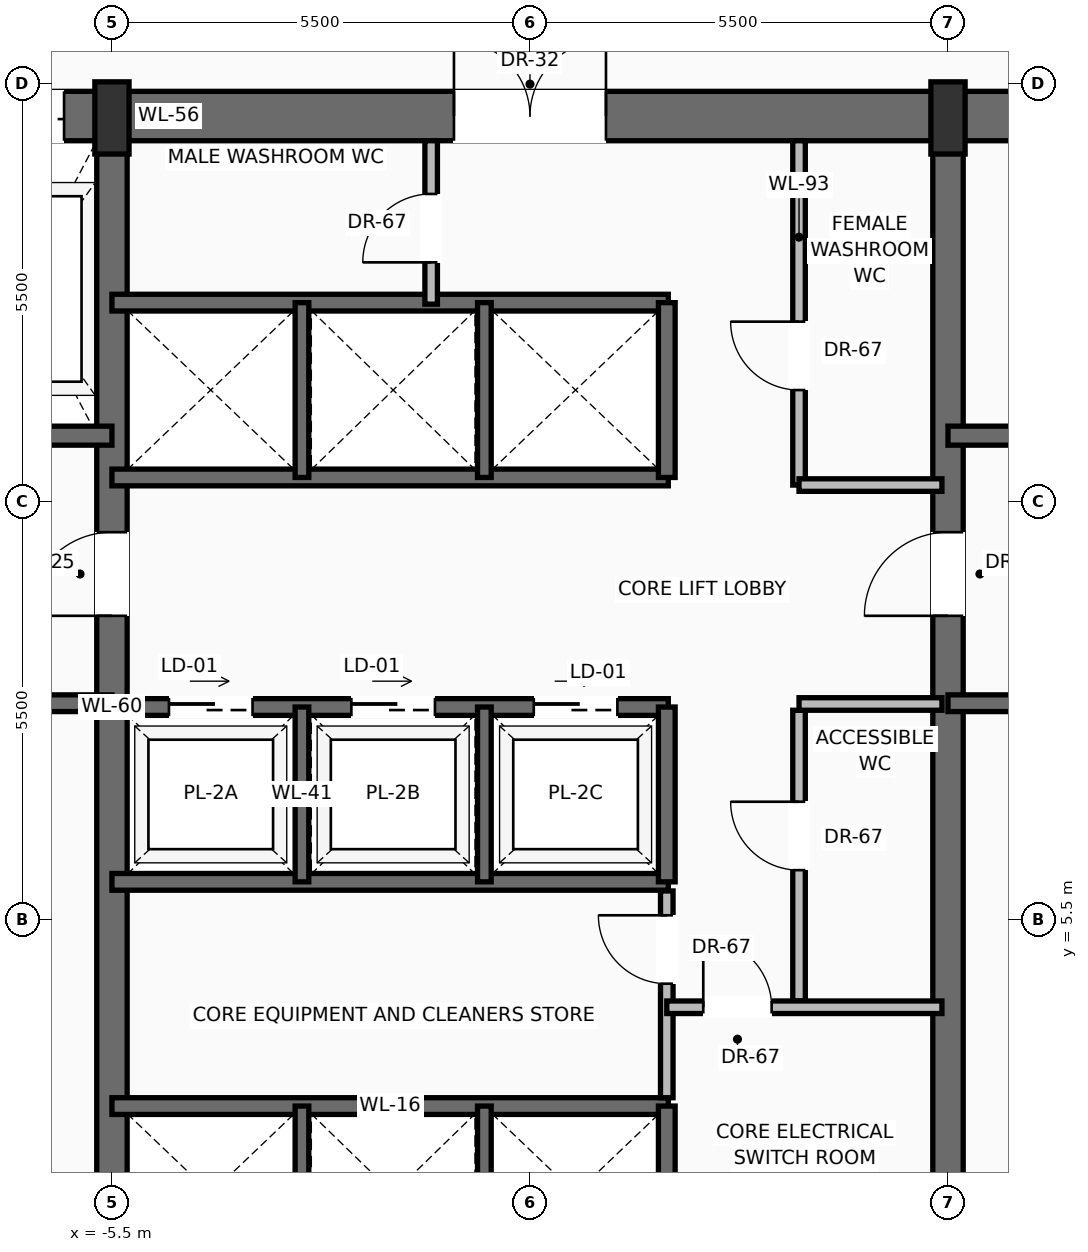
"""IFC4 building model, lengths in metres.
Left out: names, types, materials, properties, quantities, classifications, styles, units other than length and angle.
Written with IfcOpenShell. Run it as: python <this file> out.ifc"""

import sys

from ifc_helpers import new_model, si_unit, direction, frame, frame_2d, origin, origin_2d, place, context, subcontext, project, spatial, rectangle, extrude, source, transform, mapped, element, fill, save


model = new_model("IFC4")
c1 = context("Model", 3, precision=1e-05, world=origin(), true_north=direction((0.0, 1.0)))
c2 = subcontext(c1, "Body", "Model", "MODEL_VIEW")
j1 = project(units=[si_unit("LENGTHUNIT", "METRE"), si_unit("PLANEANGLEUNIT", "RADIAN")], contexts=[c1])
p1 = place(None, origin())
s1 = spatial("IfcSite", under=j1, at=p1, CompositionType="ELEMENT")
p2 = place(p1, origin())
s2 = spatial("IfcBuilding", under=s1, at=p2, CompositionType="ELEMENT")
p3 = place(p2, frame((0.0, 0.0, 125.6)))
s3 = spatial("IfcBuildingStorey", under=s2, at=p3, CompositionType="ELEMENT", Elevation=125.6)
p4 = place(p3, frame((-10.8, 16.075, 0.0), z_axis=(0.0, 0.0, 1.0), x_axis=(1.0, 0.0, 0.0)))
e1 = element("IfcWall", 1, at=p4, inside=s3, PredefinedType="SHEAR", context=c2, shape_type="SweptSolid", body=[
    extrude(rectangle(XDim=21.6, YDim=0.65, at=frame_2d((10.8, 0.0))), origin(), (0.0, 0.0, 1.0), 3.47),
])
p5 = place(p4, frame((3.37, 0.0, 0.0)))
e2 = element("IfcOpeningElement", 2, at=p5, cuts=e1, PredefinedType="OPENING", context=c2, shape_type="SweptSolid", body=[
    extrude(rectangle(XDim=1.3, YDim=2.3, at=frame_2d((0.65, 1.15))), frame((0.0, 0.335, 0.0), z_axis=(0.0, -1.0, 0.0), x_axis=(1.0, 0.0, 0.0)), (0.0, 0.0, 1.0), 0.67),
])
p6 = place(p4, frame((9.8, 0.0, 0.0)))
e3 = element("IfcOpeningElement", 3, at=p6, cuts=e1, PredefinedType="OPENING", context=c2, shape_type="SweptSolid", body=[
    extrude(rectangle(XDim=2.0, YDim=2.4, at=frame_2d((1.0, 1.2))), frame((0.0, 0.335, 0.0), z_axis=(0.0, -1.0, 0.0), x_axis=(1.0, 0.0, 0.0)), (0.0, 0.0, 1.0), 0.67),
])
p7 = place(p3, frame((-5.5, 0.525, 0.0), z_axis=(0.0, 0.0, 1.0), x_axis=(0.0, 1.0, 0.0)))
e4 = element("IfcWall", 4, at=p7, inside=s3, PredefinedType="SHEAR", context=c2, shape_type="SweptSolid", body=[
    extrude(rectangle(XDim=15.55, YDim=0.4, at=frame_2d((7.775, 0.0))), origin(), (0.0, 0.0, 1.0), 3.47),
])
p8 = place(p7, frame((8.975, 0.0, 0.0)))
e5 = element("IfcOpeningElement", 5, at=p8, cuts=e4, PredefinedType="OPENING", context=c2, shape_type="SweptSolid", body=[
    extrude(rectangle(XDim=1.1, YDim=2.2, at=frame_2d((0.55, 1.1))), frame((0.0, 0.21, 0.0), z_axis=(0.0, -1.0, 0.0), x_axis=(1.0, 0.0, 0.0)), (0.0, 0.0, 1.0), 0.42),
])
p9 = place(p3, frame((5.5, 0.525, 0.0), z_axis=(0.0, 0.0, 1.0), x_axis=(0.0, 1.0, 0.0)))
e6 = element("IfcWall", 6, at=p9, inside=s3, PredefinedType="SHEAR", context=c2, shape_type="SweptSolid", body=[
    extrude(rectangle(XDim=15.55, YDim=0.4, at=frame_2d((7.775, 0.0))), origin(), (0.0, 0.0, 1.0), 3.47),
])
p10 = place(p9, frame((8.975, 0.0, 0.0)))
e7 = element("IfcOpeningElement", 7, at=p10, cuts=e6, PredefinedType="OPENING", context=c2, shape_type="SweptSolid", body=[
    extrude(rectangle(XDim=1.1, YDim=2.2, at=frame_2d((0.55, 1.1))), frame((0.0, 0.21, 0.0), z_axis=(0.0, -1.0, 0.0), x_axis=(1.0, 0.0, 0.0)), (0.0, 0.0, 1.0), 0.42),
])
m1 = source(origin(), c2, "Body", "SweptSolid", [
    extrude(rectangle(XDim=0.45, YDim=0.95, at=origin_2d()), origin(), (0.0, 0.0, 1.0), 3.7),
])
for number, where, z_axis, x_axis in (
    (8, (-5.5, 16.05, 0.0), (0.0, 0.0, 1.0), (1.0, 0.0, 0.0)),
    (9, (5.5, 16.05, 0.0), (0.0, 0.0, 1.0), (1.0, 0.0, 0.0)),
):
    element("IfcColumn", number, at=place(p3, frame(where, z_axis=z_axis, x_axis=x_axis)), inside=s3, PredefinedType="PILASTER", context=c2, shape_type="MappedRepresentation", body=[
        mapped(m1, transform((0.0, 0.0, 0.0), scale=1.0)),
    ])
p11 = place(p3, frame((-5.5, 8.35, 0.0), z_axis=(0.0, 0.0, 1.0), x_axis=(-1.0, 0.0, 0.0)))
e10 = element("IfcWall", 10, at=p11, inside=s3, PredefinedType="SOLIDWALL", context=c2, shape_type="SweptSolid", body=[
    extrude(rectangle(XDim=4.65, YDim=0.22, at=frame_2d((2.325, 0.0))), origin(), (0.0, 0.0, 1.0), 3.47),
])
p12 = place(p11, frame((2.5, 0.0, 0.0)))
e11 = element("IfcOpeningElement", 11, at=p12, cuts=e10, PredefinedType="OPENING", context=c2, shape_type="SweptSolid", body=[
    extrude(rectangle(XDim=1.15, YDim=2.2, at=frame_2d((0.575, 1.1))), frame((0.0, 0.12, 0.0), z_axis=(0.0, -1.0, 0.0), x_axis=(1.0, 0.0, 0.0)), (0.0, 0.0, 1.0), 0.24),
])
p13 = place(p3, frame((-5.5, 11.87, 0.0), z_axis=(0.0, 0.0, 1.0), x_axis=(-1.0, 0.0, 0.0)))
e12 = element("IfcWall", 12, at=p13, inside=s3, PredefinedType="SOLIDWALL", context=c2, shape_type="SweptSolid", body=[
    extrude(rectangle(XDim=4.65, YDim=0.25, at=frame_2d((2.325, 0.0))), origin(), (0.0, 0.0, 1.0), 3.47),
])
p14 = place(p13, frame((2.95, 0.0, 0.0)))
e13 = element("IfcOpeningElement", 13, at=p14, cuts=e12, PredefinedType="OPENING", context=c2, shape_type="SweptSolid", body=[
    extrude(rectangle(XDim=1.2, YDim=2.25, at=frame_2d((0.6, 1.125))), frame((0.0, 0.135, 0.0), z_axis=(0.0, -1.0, 0.0), x_axis=(1.0, 0.0, 0.0)), (0.0, 0.0, 1.0), 0.27),
])
p15 = place(p3, frame((10.15, 8.35, 0.0), z_axis=(0.0, 0.0, 1.0), x_axis=(-1.0, 0.0, 0.0)))
e14 = element("IfcWall", 14, at=p15, inside=s3, PredefinedType="SOLIDWALL", context=c2, shape_type="SweptSolid", body=[
    extrude(rectangle(XDim=4.65, YDim=0.22, at=frame_2d((2.325, 0.0))), origin(), (0.0, 0.0, 1.0), 3.47),
])
p16 = place(p15, frame((1.0, 0.0, 0.0)))
e15 = element("IfcOpeningElement", 15, at=p16, cuts=e14, PredefinedType="OPENING", context=c2, shape_type="SweptSolid", body=[
    extrude(rectangle(XDim=1.15, YDim=2.2, at=frame_2d((0.575, 1.1))), frame((0.0, 0.12, 0.0), z_axis=(0.0, -1.0, 0.0), x_axis=(1.0, 0.0, 0.0)), (0.0, 0.0, 1.0), 0.24),
])
p17 = place(p3, frame((10.15, 11.87, 0.0), z_axis=(0.0, 0.0, 1.0), x_axis=(-1.0, 0.0, 0.0)))
e16 = element("IfcWall", 16, at=p17, inside=s3, PredefinedType="SOLIDWALL", context=c2, shape_type="SweptSolid", body=[
    extrude(rectangle(XDim=4.65, YDim=0.25, at=frame_2d((2.325, 0.0))), origin(), (0.0, 0.0, 1.0), 3.47),
])
p18 = place(p17, frame((0.5, 0.0, 0.0)))
e17 = element("IfcOpeningElement", 17, at=p18, cuts=e16, PredefinedType="OPENING", context=c2, shape_type="SweptSolid", body=[
    extrude(rectangle(XDim=1.2, YDim=2.25, at=frame_2d((0.6, 1.125))), frame((0.0, 0.135, 0.0), z_axis=(0.0, -1.0, 0.0), x_axis=(1.0, 0.0, 0.0)), (0.0, 0.0, 1.0), 0.27),
])
p19 = place(p3, frame((-5.5, 3.05, 0.0), z_axis=(0.0, 0.0, 1.0), x_axis=(1.0, 0.0, 0.0)))
e18 = element("IfcWall", 18, at=p19, inside=s3, PredefinedType="SOLIDWALL", context=c2, shape_type="SweptSolid", body=[
    extrude(rectangle(XDim=7.32, YDim=0.22, at=frame_2d((3.66, 0.0))), origin(), (0.0, 0.0, 1.0), 3.47),
])
p20 = place(p3, frame((1.8, 0.85, 0.0), z_axis=(0.0, 0.0, 1.0), x_axis=(0.0, 1.0, 0.0)))
e19 = element("IfcWall", 19, at=p20, inside=s3, PredefinedType="SOLIDWALL", context=c2, shape_type="SweptSolid", body=[
    extrude(rectangle(XDim=2.2, YDim=0.22, at=frame_2d((1.1, 0.0))), origin(), (0.0, 0.0, 1.0), 3.47),
])
for number, where, z_axis, x_axis in (
    (20, (-3.0, 0.85, 0.0), (0.0, 0.0, 1.0), (0.0, 1.0, 0.0)),
    (21, (-0.6, 0.85, 0.0), (0.0, 0.0, 1.0), (0.0, 1.0, 0.0)),
):
    element("IfcWall", number, at=place(p3, frame(where, z_axis=z_axis, x_axis=x_axis)), inside=s3, PredefinedType="SOLIDWALL", context=c2, shape_type="SweptSolid", body=[
        extrude(rectangle(XDim=2.2, YDim=0.18, at=frame_2d((1.1, 0.0))), origin(), (0.0, 0.0, 1.0), 3.47),
    ])
p21 = place(p3, frame((1.8, 3.16, 0.0), z_axis=(0.0, 0.0, 1.0), x_axis=(0.0, 1.0, 0.0)))
e22 = element("IfcWall", 22, at=p21, inside=s3, PredefinedType="PARTITIONING", context=c2, shape_type="SweptSolid", body=[
    extrude(rectangle(XDim=2.72, YDim=0.165, at=frame_2d((1.36, 0.0))), origin(), (0.0, 0.0, 1.0), 3.462),
])
p22 = place(p21, frame((1.5, 0.0, 0.0)))
e23 = element("IfcOpeningElement", 23, at=p22, cuts=e22, PredefinedType="OPENING", context=c2, shape_type="SweptSolid", body=[
    extrude(rectangle(XDim=0.9, YDim=2.1, at=frame_2d((0.45, 1.05))), frame((0.0, 0.093, 0.0), z_axis=(0.0, -1.0, 0.0), x_axis=(1.0, 0.0, 0.0)), (0.0, 0.0, 1.0), 0.185),
])
p23 = place(p3, frame((3.54, 4.433, 0.0), z_axis=(0.0, 0.0, 1.0), x_axis=(0.0, 1.0, 0.0)))
e24 = element("IfcWall", 24, at=p23, inside=s3, PredefinedType="PARTITIONING", context=c2, shape_type="SweptSolid", body=[
    extrude(rectangle(XDim=3.825, YDim=0.165, at=frame_2d((1.913, 0.0))), origin(), (0.0, 0.0, 1.0), 3.462),
])
p24 = place(p23, frame((1.721, 0.0, 0.0)))
e25 = element("IfcOpeningElement", 25, at=p24, cuts=e24, PredefinedType="OPENING", context=c2, shape_type="SweptSolid", body=[
    extrude(rectangle(XDim=0.9, YDim=2.1, at=frame_2d((0.45, 1.05))), frame((0.0, 0.093, 0.0), z_axis=(0.0, -1.0, 0.0), x_axis=(1.0, 0.0, 0.0)), (0.0, 0.0, 1.0), 0.185),
])
p25 = place(p3, frame((3.54, 8.34, 0.0), z_axis=(0.0, 0.0, 1.0), x_axis=(1.0, 0.0, 0.0)))
e26 = element("IfcWall", 26, at=p25, inside=s3, PredefinedType="PARTITIONING", context=c2, shape_type="SweptSolid", body=[
    extrude(rectangle(XDim=1.88, YDim=0.165, at=frame_2d((0.94, 0.0))), origin(), (0.0, 0.0, 1.0), 3.462),
])
p26 = place(p3, frame((1.8, 4.35, 0.0), z_axis=(0.0, 0.0, 1.0), x_axis=(1.0, 0.0, 0.0)))
e27 = element("IfcWall", 27, at=p26, inside=s3, PredefinedType="PARTITIONING", context=c2, shape_type="SweptSolid", body=[
    extrude(rectangle(XDim=3.62, YDim=0.165, at=frame_2d((1.81, 0.0))), origin(), (0.0, 0.0, 1.0), 3.462),
])
p27 = place(p26, frame((0.48, 0.0, 0.0)))
e28 = element("IfcOpeningElement", 28, at=p27, cuts=e27, PredefinedType="OPENING", context=c2, shape_type="SweptSolid", body=[
    extrude(rectangle(XDim=0.9, YDim=2.1, at=frame_2d((0.45, 1.05))), frame((0.0, 0.093, 0.0), z_axis=(0.0, -1.0, 0.0), x_axis=(1.0, 0.0, 0.0)), (0.0, 0.0, 1.0), 0.185),
])
p28 = place(p3, frame((-5.5, 6.0, 0.0), z_axis=(0.0, 0.0, 1.0), x_axis=(1.0, 0.0, 0.0)))
e29 = element("IfcWall", 29, at=p28, inside=s3, PredefinedType="SOLIDWALL", context=c2, shape_type="SweptSolid", body=[
    extrude(rectangle(XDim=7.32, YDim=0.22, at=frame_2d((3.66, 0.0))), origin(), (0.0, 0.0, 1.0), 3.47),
])
p29 = place(p3, frame((-5.5, 8.3, 0.0), z_axis=(0.0, 0.0, 1.0), x_axis=(1.0, 0.0, 0.0)))
e30 = element("IfcWall", 30, at=p29, inside=s3, PredefinedType="SOLIDWALL", context=c2, shape_type="SweptSolid", body=[
    extrude(rectangle(XDim=7.32, YDim=0.22, at=frame_2d((3.66, 0.0))), origin(), (0.0, 0.0, 1.0), 3.47),
])
p30 = place(p29, frame((0.75, 0.0, 0.0)))
e31 = element("IfcOpeningElement", 31, at=p30, cuts=e30, PredefinedType="OPENING", context=c2, shape_type="SweptSolid", body=[
    extrude(rectangle(XDim=1.1, YDim=2.2, at=frame_2d((0.55, 1.1))), frame((0.0, 0.12, 0.0), z_axis=(0.0, -1.0, 0.0), x_axis=(1.0, 0.0, 0.0)), (0.0, 0.0, 1.0), 0.24),
])
p31 = place(p29, frame((3.15, 0.0, 0.0)))
e32 = element("IfcOpeningElement", 32, at=p31, cuts=e30, PredefinedType="OPENING", context=c2, shape_type="SweptSolid", body=[
    extrude(rectangle(XDim=1.1, YDim=2.2, at=frame_2d((0.55, 1.1))), frame((0.0, 0.12, 0.0), z_axis=(0.0, -1.0, 0.0), x_axis=(1.0, 0.0, 0.0)), (0.0, 0.0, 1.0), 0.24),
])
p32 = place(p29, frame((5.55, 0.0, 0.0)))
e33 = element("IfcOpeningElement", 33, at=p32, cuts=e30, PredefinedType="OPENING", context=c2, shape_type="SweptSolid", body=[
    extrude(rectangle(XDim=1.1, YDim=2.2, at=frame_2d((0.55, 1.1))), frame((0.0, 0.12, 0.0), z_axis=(0.0, -1.0, 0.0), x_axis=(1.0, 0.0, 0.0)), (0.0, 0.0, 1.0), 0.24),
])
p33 = place(p3, frame((1.8, 6.0, 0.0), z_axis=(0.0, 0.0, 1.0), x_axis=(0.0, 1.0, 0.0)))
e34 = element("IfcWall", 34, at=p33, inside=s3, PredefinedType="SOLIDWALL", context=c2, shape_type="SweptSolid", body=[
    extrude(rectangle(XDim=2.3, YDim=0.22, at=frame_2d((1.15, 0.0))), origin(), (0.0, 0.0, 1.0), 3.47),
])
for number, where, z_axis, x_axis in (
    (35, (-3.0, 6.0, 0.0), (0.0, 0.0, 1.0), (0.0, 1.0, 0.0)),
    (36, (-0.6, 6.0, 0.0), (0.0, 0.0, 1.0), (0.0, 1.0, 0.0)),
):
    element("IfcWall", number, at=place(p3, frame(where, z_axis=z_axis, x_axis=x_axis)), inside=s3, PredefinedType="SOLIDWALL", context=c2, shape_type="SweptSolid", body=[
        extrude(rectangle(XDim=2.3, YDim=0.18, at=frame_2d((1.15, 0.0))), origin(), (0.0, 0.0, 1.0), 3.47),
    ])
for number, where, z_axis, x_axis in (
    (37, (-5.5, 11.32, 0.0), (0.0, 0.0, 1.0), (1.0, 0.0, 0.0)),
    (38, (-5.5, 13.62, 0.0), (0.0, 0.0, 1.0), (1.0, 0.0, 0.0)),
):
    element("IfcWall", number, at=place(p3, frame(where, z_axis=z_axis, x_axis=x_axis)), inside=s3, PredefinedType="SOLIDWALL", context=c2, shape_type="SweptSolid", body=[
        extrude(rectangle(XDim=7.32, YDim=0.22, at=frame_2d((3.66, 0.0))), origin(), (0.0, 0.0, 1.0), 3.47),
    ])
p34 = place(p3, frame((1.8, 11.32, 0.0), z_axis=(0.0, 0.0, 1.0), x_axis=(0.0, 1.0, 0.0)))
e39 = element("IfcWall", 39, at=p34, inside=s3, PredefinedType="SOLIDWALL", context=c2, shape_type="SweptSolid", body=[
    extrude(rectangle(XDim=2.3, YDim=0.22, at=frame_2d((1.15, 0.0))), origin(), (0.0, 0.0, 1.0), 3.47),
])
for number, where, z_axis, x_axis in (
    (40, (-3.0, 11.32, 0.0), (0.0, 0.0, 1.0), (0.0, 1.0, 0.0)),
    (41, (-0.6, 11.32, 0.0), (0.0, 0.0, 1.0), (0.0, 1.0, 0.0)),
):
    element("IfcWall", number, at=place(p3, frame(where, z_axis=z_axis, x_axis=x_axis)), inside=s3, PredefinedType="SOLIDWALL", context=c2, shape_type="SweptSolid", body=[
        extrude(rectangle(XDim=2.3, YDim=0.18, at=frame_2d((1.15, 0.0))), origin(), (0.0, 0.0, 1.0), 3.47),
    ])
p35 = place(p3, frame((-1.3, 13.6, 0.0), z_axis=(0.0, 0.0, 1.0), x_axis=(0.0, 1.0, 0.0)))
e42 = element("IfcWall", 42, at=p35, inside=s3, PredefinedType="PARTITIONING", context=c2, shape_type="SweptSolid", body=[
    extrude(rectangle(XDim=2.15, YDim=0.165, at=frame_2d((1.075, 0.0))), origin(), (0.0, 0.0, 1.0), 3.462),
])
p36 = place(p35, frame((0.55, 0.0, 0.0)))
e43 = element("IfcOpeningElement", 43, at=p36, cuts=e42, PredefinedType="OPENING", context=c2, shape_type="SweptSolid", body=[
    extrude(rectangle(XDim=0.9, YDim=2.1, at=frame_2d((0.45, 1.05))), frame((0.0, 0.093, 0.0), z_axis=(0.0, -1.0, 0.0), x_axis=(1.0, 0.0, 0.0)), (0.0, 0.0, 1.0), 0.185),
])
p37 = place(p3, frame((3.54, 11.22, 0.0), z_axis=(0.0, 0.0, 1.0), x_axis=(0.0, 1.0, 0.0)))
e44 = element("IfcWall", 44, at=p37, inside=s3, PredefinedType="PARTITIONING", context=c2, shape_type="SweptSolid", body=[
    extrude(rectangle(XDim=4.53, YDim=0.165, at=frame_2d((2.265, 0.0))), origin(), (0.0, 0.0, 1.0), 3.462),
])
p38 = place(p37, frame((1.25, 0.0, 0.0)))
e45 = element("IfcOpeningElement", 45, at=p38, cuts=e44, PredefinedType="OPENING", context=c2, shape_type="SweptSolid", body=[
    extrude(rectangle(XDim=0.9, YDim=2.1, at=frame_2d((0.45, 1.05))), frame((0.0, 0.093, 0.0), z_axis=(0.0, -1.0, 0.0), x_axis=(1.0, 0.0, 0.0)), (0.0, 0.0, 1.0), 0.185),
])
p39 = place(p3, frame((3.54, 11.22, 0.0), z_axis=(0.0, 0.0, 1.0), x_axis=(1.0, 0.0, 0.0)))
e46 = element("IfcWall", 46, at=p39, inside=s3, PredefinedType="PARTITIONING", context=c2, shape_type="SweptSolid", body=[
    extrude(rectangle(XDim=1.88, YDim=0.165, at=frame_2d((0.94, 0.0))), origin(), (0.0, 0.0, 1.0), 3.462),
])
m2 = source(origin(), c2, "Body", "SweptSolid", [
    extrude(rectangle(XDim=1.1, YDim=2.2, at=frame_2d((0.55, 1.1))), frame((0.0, 0.025, 0.0), z_axis=(0.0, -1.0, 0.0), x_axis=(1.0, 0.0, 0.0)), (0.0, 0.0, 1.0), 0.05),
])
p40 = place(p8, origin())
e47 = element("IfcDoor", 47, at=p40, inside=s3, OperationType="SINGLE_SWING_LEFT", PredefinedType="DOOR", context=c2, shape_type="MappedRepresentation", body=[
    mapped(m2, transform((0.0, 0.0, 0.0), scale=1.0)),
])
fill(e5, e47)
m3 = source(origin(), c2, "Body", "SweptSolid", [
    extrude(rectangle(XDim=1.3, YDim=2.3, at=frame_2d((0.65, 1.15))), frame((0.0, 0.025, 0.0), z_axis=(0.0, -1.0, 0.0), x_axis=(1.0, 0.0, 0.0)), (0.0, 0.0, 1.0), 0.05),
])
p41 = place(p5, origin())
e48 = element("IfcDoor", 48, at=p41, inside=s3, OperationType="SLIDING_TO_RIGHT", PredefinedType="DOOR", context=c2, shape_type="MappedRepresentation", body=[
    mapped(m3, transform((0.0, 0.0, 0.0), scale=1.0)),
])
fill(e2, e48)
p42 = place(p10, origin())
e49 = element("IfcDoor", 49, at=p42, inside=s3, OperationType="SINGLE_SWING_LEFT", PredefinedType="DOOR", context=c2, shape_type="MappedRepresentation", body=[
    mapped(m2, transform((0.0, 0.0, 0.0), scale=1.0)),
])
fill(e7, e49)
m4 = source(origin(), c2, "Body", "SweptSolid", [
    extrude(rectangle(XDim=2.0, YDim=2.4, at=frame_2d((1.0, 1.2))), frame((0.0, 0.025, 0.0), z_axis=(0.0, -1.0, 0.0), x_axis=(1.0, 0.0, 0.0)), (0.0, 0.0, 1.0), 0.05),
])
p43 = place(p6, origin())
e50 = element("IfcDoor", 50, at=p43, inside=s3, OperationType="DOUBLE_DOOR_SINGLE_SWING", PredefinedType="DOOR", context=c2, shape_type="MappedRepresentation", body=[
    mapped(m4, transform((0.0, 0.0, 0.0), scale=1.0)),
])
fill(e3, e50)
m5 = source(origin(), c2, "Body", "SweptSolid", [
    extrude(rectangle(XDim=0.9, YDim=2.1, at=frame_2d((0.45, 1.05))), frame((0.0, 0.025, 0.0), z_axis=(0.0, -1.0, 0.0), x_axis=(1.0, 0.0, 0.0)), (0.0, 0.0, 1.0), 0.05),
])
p44 = place(p22, origin())
e51 = element("IfcDoor", 51, at=p44, inside=s3, OperationType="SINGLE_SWING_RIGHT", PredefinedType="DOOR", context=c2, shape_type="MappedRepresentation", body=[
    mapped(m5, transform((0.0, 0.0, 0.0), scale=1.0)),
])
fill(e23, e51)
p45 = place(p27, origin())
e52 = element("IfcDoor", 52, at=p45, inside=s3, OperationType="SINGLE_SWING_LEFT", PredefinedType="DOOR", context=c2, shape_type="MappedRepresentation", body=[
    mapped(m5, transform((0.0, 0.0, 0.0), scale=1.0)),
])
fill(e28, e52)
p46 = place(p24, origin())
e53 = element("IfcDoor", 53, at=p46, inside=s3, OperationType="SINGLE_SWING_RIGHT", PredefinedType="DOOR", context=c2, shape_type="MappedRepresentation", body=[
    mapped(m5, transform((0.0, 0.0, 0.0), scale=1.0)),
])
fill(e25, e53)
m6 = source(origin(), c2, "Body", "SweptSolid", [
    extrude(rectangle(XDim=1.1, YDim=2.2, at=frame_2d((0.55, 1.1))), frame((0.0, 0.025, 0.0), z_axis=(0.0, -1.0, 0.0), x_axis=(1.0, 0.0, 0.0)), (0.0, 0.0, 1.0), 0.05),
])
p47 = place(p30, origin())
e54 = element("IfcDoor", 54, at=p47, inside=s3, OperationType="SLIDING_TO_LEFT", PredefinedType="DOOR", context=c2, shape_type="MappedRepresentation", body=[
    mapped(m6, transform((0.0, 0.0, 0.0), scale=1.0)),
])
fill(e31, e54)
p48 = place(p31, origin())
e55 = element("IfcDoor", 55, at=p48, inside=s3, OperationType="SLIDING_TO_LEFT", PredefinedType="DOOR", context=c2, shape_type="MappedRepresentation", body=[
    mapped(m6, transform((0.0, 0.0, 0.0), scale=1.0)),
])
fill(e32, e55)
p49 = place(p32, origin())
e56 = element("IfcDoor", 56, at=p49, inside=s3, OperationType="SLIDING_TO_LEFT", PredefinedType="DOOR", context=c2, shape_type="MappedRepresentation", body=[
    mapped(m6, transform((0.0, 0.0, 0.0), scale=1.0)),
])
fill(e33, e56)
p50 = place(p36, origin())
e57 = element("IfcDoor", 57, at=p50, inside=s3, OperationType="SINGLE_SWING_LEFT", PredefinedType="DOOR", context=c2, shape_type="MappedRepresentation", body=[
    mapped(m5, transform((0.0, 0.0, 0.0), scale=1.0)),
])
fill(e43, e57)
p51 = place(p38, origin())
e58 = element("IfcDoor", 58, at=p51, inside=s3, OperationType="SINGLE_SWING_RIGHT", PredefinedType="DOOR", context=c2, shape_type="MappedRepresentation", body=[
    mapped(m5, transform((0.0, 0.0, 0.0), scale=1.0)),
])
fill(e45, e58)
save(model, sys.argv[1])
